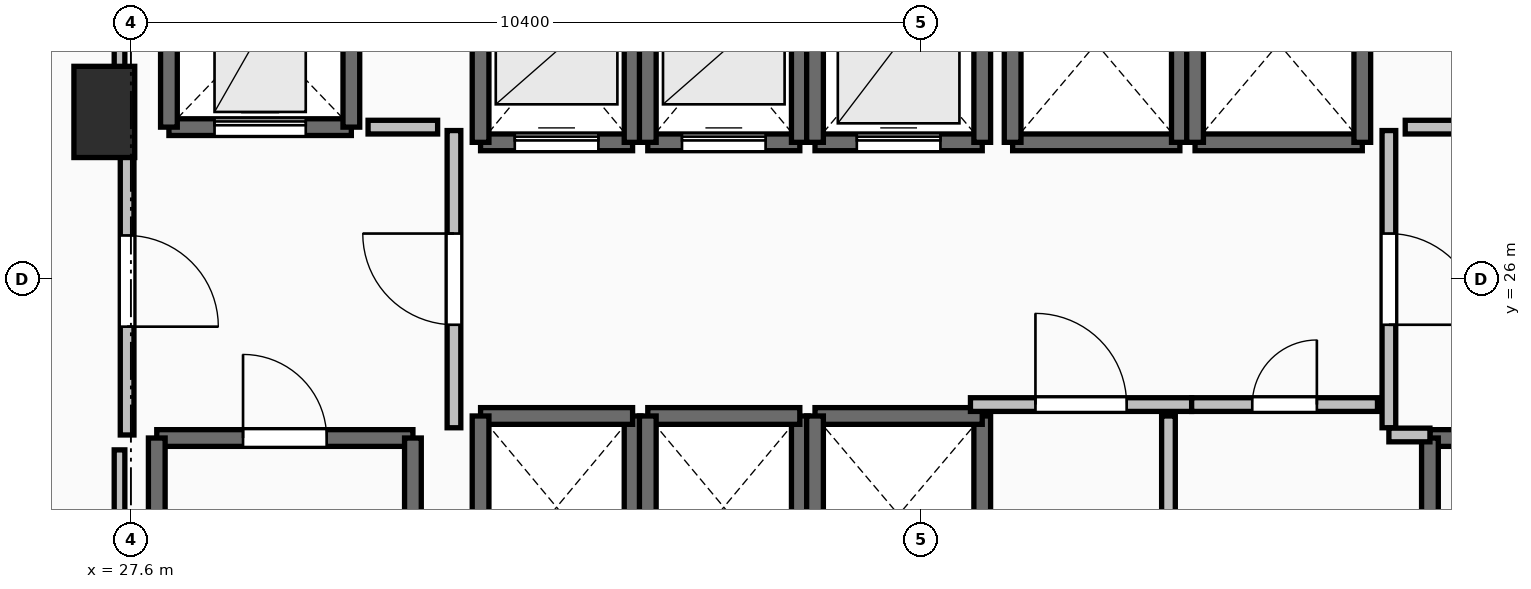
"""IFC4 building model, lengths in metres.
Left out: names, types, materials, properties, quantities, classifications, styles, units other than length and angle.
Written with IfcOpenShell. Run it as: python <this file> out.ifc"""

import sys

from ifc_helpers import new_model, si_unit, direction, frame, frame_2d, origin, origin_2d, place, context, subcontext, project, spatial, rectangle, extrude, element, fill, save


model = new_model("IFC4")
c1 = context("Model", 3, precision=1e-05, world=origin(), true_north=direction((0.0, 1.0)))
c2 = subcontext(c1, "Body", "Model", "MODEL_VIEW")
j1 = project(units=[si_unit("LENGTHUNIT", "METRE"), si_unit("PLANEANGLEUNIT", "RADIAN")], contexts=[c1])
p1 = place(None, origin())
s1 = spatial("IfcSite", under=j1, at=p1, CompositionType="ELEMENT")
p2 = place(p1, origin())
s2 = spatial("IfcBuilding", under=s1, at=p2, CompositionType="ELEMENT")
p3 = place(p2, frame((0.0, 0.0, 4.8)))
s3 = spatial("IfcBuildingStorey", under=s2, at=p3, CompositionType="ELEMENT", Elevation=4.8)
p4 = place(p3, frame((27.25, 28.2, 0.0), z_axis=(0.0, 0.0, 1.0), x_axis=(1.0, 0.0, 0.0)))
e1 = element("IfcColumn", 1, at=p4, inside=s3, PredefinedType="PILASTER", context=c2, shape_type="SweptSolid", body=[
    extrude(rectangle(XDim=0.8, YDim=1.2, at=origin_2d()), origin(), (0.0, 0.0, 1.0), 4.8),
])
p5 = place(p3, frame((27.94, 23.91, 0.0), z_axis=(0.0, 0.0, 1.0), x_axis=(1.0, 0.0, 0.0)))
e2 = element("IfcWall", 2, at=p5, inside=s3, PredefinedType="SOLIDWALL", context=c2, shape_type="SweptSolid", body=[
    extrude(rectangle(XDim=3.37, YDim=0.22, at=frame_2d((1.685, 0.0))), origin(), (0.0, 0.0, 1.0), 4.48),
])
p6 = place(p5, frame((1.135, 0.0, 0.0)))
e3 = element("IfcOpeningElement", 3, at=p6, cuts=e2, PredefinedType="OPENING", context=c2, shape_type="SweptSolid", body=[
    extrude(rectangle(XDim=1.1, YDim=2.15, at=frame_2d((0.55, 1.075))), frame((0.0, 0.125, 0.0), z_axis=(0.0, -1.0, 0.0), x_axis=(1.0, 0.0, 0.0)), (0.0, 0.0, 1.0), 0.25),
])
for number, where, z_axis, x_axis in (
    (4, (31.31, 23.91, 0.0), (0.0, 0.0, 1.0), (0.0, -1.0, 0.0)),
    (5, (27.94, 16.49, 0.0), (0.0, 0.0, 1.0), (0.0, 1.0, 0.0)),
):
    element("IfcWall", number, at=place(p3, frame(where, z_axis=z_axis, x_axis=x_axis)), inside=s3, PredefinedType="SOLIDWALL", context=c2, shape_type="SweptSolid", body=[
        extrude(rectangle(XDim=7.42, YDim=0.22, at=frame_2d((3.71, 0.0))), origin(), (0.0, 0.0, 1.0), 4.48),
    ])
p7 = place(p3, frame((44.69, 23.91, 0.0), z_axis=(0.0, 0.0, 1.0), x_axis=(1.0, 0.0, 0.0)))
e6 = element("IfcWall", 6, at=p7, inside=s3, PredefinedType="SOLIDWALL", context=c2, shape_type="SweptSolid", body=[
    extrude(rectangle(XDim=3.37, YDim=0.22, at=frame_2d((1.685, 0.0))), origin(), (0.0, 0.0, 1.0), 4.48),
])
p8 = place(p7, frame((1.135, 0.0, 0.0)))
e7 = element("IfcOpeningElement", 7, at=p8, cuts=e6, PredefinedType="OPENING", context=c2, shape_type="SweptSolid", body=[
    extrude(rectangle(XDim=1.1, YDim=2.15, at=frame_2d((0.55, 1.075))), frame((0.0, 0.125, 0.0), z_axis=(0.0, -1.0, 0.0), x_axis=(1.0, 0.0, 0.0)), (0.0, 0.0, 1.0), 0.25),
])
p9 = place(p3, frame((44.69, 16.49, 0.0), z_axis=(0.0, 0.0, 1.0), x_axis=(0.0, 1.0, 0.0)))
e8 = element("IfcWall", 8, at=p9, inside=s3, PredefinedType="SOLIDWALL", context=c2, shape_type="SweptSolid", body=[
    extrude(rectangle(XDim=7.42, YDim=0.22, at=frame_2d((3.71, 0.0))), origin(), (0.0, 0.0, 1.0), 4.48),
])
p10 = place(p3, frame((32.2, 27.8, 0.0), z_axis=(0.0, 0.0, 1.0), x_axis=(1.0, 0.0, 0.0)))
e9 = element("IfcWall", 9, at=p10, inside=s3, PredefinedType="SOLIDWALL", context=c2, shape_type="SweptSolid", body=[
    extrude(rectangle(XDim=2.0, YDim=0.22, at=frame_2d((1.0, 0.0))), origin(), (0.0, 0.0, 1.0), 4.48),
])
p11 = place(p10, frame((0.45, 0.0, 0.0)))
e10 = element("IfcOpeningElement", 10, at=p11, cuts=e9, PredefinedType="OPENING", context=c2, shape_type="SweptSolid", body=[
    extrude(rectangle(XDim=1.1, YDim=2.2, at=frame_2d((0.55, 1.1))), frame((0.0, 0.125, 0.0), z_axis=(0.0, -1.0, 0.0), x_axis=(1.0, 0.0, 0.0)), (0.0, 0.0, 1.0), 0.25),
])
for number, where, z_axis, x_axis in (
    (11, (34.2, 27.8, 0.0), (0.0, 0.0, 1.0), (0.0, 1.0, 0.0)),
    (12, (32.2, 30.2, 0.0), (0.0, 0.0, 1.0), (0.0, -1.0, 0.0)),
):
    element("IfcWall", number, at=place(p3, frame(where, z_axis=z_axis, x_axis=x_axis)), inside=s3, PredefinedType="SOLIDWALL", context=c2, shape_type="SweptSolid", body=[
        extrude(rectangle(XDim=2.4, YDim=0.22, at=frame_2d((1.2, 0.0))), origin(), (0.0, 0.0, 1.0), 4.48),
    ])
p12 = place(p3, frame((34.4, 27.8, 0.0), z_axis=(0.0, 0.0, 1.0), x_axis=(1.0, 0.0, 0.0)))
e13 = element("IfcWall", 13, at=p12, inside=s3, PredefinedType="SOLIDWALL", context=c2, shape_type="SweptSolid", body=[
    extrude(rectangle(XDim=2.0, YDim=0.22, at=frame_2d((1.0, 0.0))), origin(), (0.0, 0.0, 1.0), 4.48),
])
p13 = place(p12, frame((0.45, 0.0, 0.0)))
e14 = element("IfcOpeningElement", 14, at=p13, cuts=e13, PredefinedType="OPENING", context=c2, shape_type="SweptSolid", body=[
    extrude(rectangle(XDim=1.1, YDim=2.2, at=frame_2d((0.55, 1.1))), frame((0.0, 0.125, 0.0), z_axis=(0.0, -1.0, 0.0), x_axis=(1.0, 0.0, 0.0)), (0.0, 0.0, 1.0), 0.25),
])
for number, where, z_axis, x_axis in (
    (15, (36.4, 27.8, 0.0), (0.0, 0.0, 1.0), (0.0, 1.0, 0.0)),
    (16, (34.4, 30.2, 0.0), (0.0, 0.0, 1.0), (0.0, -1.0, 0.0)),
):
    element("IfcWall", number, at=place(p3, frame(where, z_axis=z_axis, x_axis=x_axis)), inside=s3, PredefinedType="SOLIDWALL", context=c2, shape_type="SweptSolid", body=[
        extrude(rectangle(XDim=2.4, YDim=0.22, at=frame_2d((1.2, 0.0))), origin(), (0.0, 0.0, 1.0), 4.48),
    ])
p14 = place(p3, frame((36.6, 27.8, 0.0), z_axis=(0.0, 0.0, 1.0), x_axis=(1.0, 0.0, 0.0)))
e17 = element("IfcWall", 17, at=p14, inside=s3, PredefinedType="SOLIDWALL", context=c2, shape_type="SweptSolid", body=[
    extrude(rectangle(XDim=2.2, YDim=0.22, at=frame_2d((1.1, 0.0))), origin(), (0.0, 0.0, 1.0), 4.48),
])
p15 = place(p14, frame((0.55, 0.0, 0.0)))
e18 = element("IfcOpeningElement", 18, at=p15, cuts=e17, PredefinedType="OPENING", context=c2, shape_type="SweptSolid", body=[
    extrude(rectangle(XDim=1.1, YDim=2.2, at=frame_2d((0.55, 1.1))), frame((0.0, 0.125, 0.0), z_axis=(0.0, -1.0, 0.0), x_axis=(1.0, 0.0, 0.0)), (0.0, 0.0, 1.0), 0.25),
])
for number, where, z_axis, x_axis in (
    (19, (38.8, 27.8, 0.0), (0.0, 0.0, 1.0), (0.0, 1.0, 0.0)),
    (20, (36.6, 30.4, 0.0), (0.0, 0.0, 1.0), (0.0, -1.0, 0.0)),
):
    element("IfcWall", number, at=place(p3, frame(where, z_axis=z_axis, x_axis=x_axis)), inside=s3, PredefinedType="SOLIDWALL", context=c2, shape_type="SweptSolid", body=[
        extrude(rectangle(XDim=2.6, YDim=0.22, at=frame_2d((1.3, 0.0))), origin(), (0.0, 0.0, 1.0), 4.48),
    ])
p16 = place(p3, frame((34.2, 21.8, 0.0), z_axis=(0.0, 0.0, 1.0), x_axis=(0.0, 1.0, 0.0)))
e21 = element("IfcWall", 21, at=p16, inside=s3, PredefinedType="SOLIDWALL", context=c2, shape_type="SweptSolid", body=[
    extrude(rectangle(XDim=2.4, YDim=0.22, at=frame_2d((1.2, 0.0))), origin(), (0.0, 0.0, 1.0), 4.48),
])
p17 = place(p3, frame((34.2, 24.2, 0.0), z_axis=(0.0, 0.0, 1.0), x_axis=(-1.0, 0.0, 0.0)))
e22 = element("IfcWall", 22, at=p17, inside=s3, PredefinedType="SOLIDWALL", context=c2, shape_type="SweptSolid", body=[
    extrude(rectangle(XDim=2.0, YDim=0.22, at=frame_2d((1.0, 0.0))), origin(), (0.0, 0.0, 1.0), 4.48),
])
for number, where, z_axis, x_axis in (
    (23, (32.2, 24.2, 0.0), (0.0, 0.0, 1.0), (0.0, -1.0, 0.0)),
    (24, (36.4, 21.8, 0.0), (0.0, 0.0, 1.0), (0.0, 1.0, 0.0)),
):
    element("IfcWall", number, at=place(p3, frame(where, z_axis=z_axis, x_axis=x_axis)), inside=s3, PredefinedType="SOLIDWALL", context=c2, shape_type="SweptSolid", body=[
        extrude(rectangle(XDim=2.4, YDim=0.22, at=frame_2d((1.2, 0.0))), origin(), (0.0, 0.0, 1.0), 4.48),
    ])
p18 = place(p3, frame((36.4, 24.2, 0.0), z_axis=(0.0, 0.0, 1.0), x_axis=(-1.0, 0.0, 0.0)))
e25 = element("IfcWall", 25, at=p18, inside=s3, PredefinedType="SOLIDWALL", context=c2, shape_type="SweptSolid", body=[
    extrude(rectangle(XDim=2.0, YDim=0.22, at=frame_2d((1.0, 0.0))), origin(), (0.0, 0.0, 1.0), 4.48),
])
p19 = place(p3, frame((34.4, 24.2, 0.0), z_axis=(0.0, 0.0, 1.0), x_axis=(0.0, -1.0, 0.0)))
e26 = element("IfcWall", 26, at=p19, inside=s3, PredefinedType="SOLIDWALL", context=c2, shape_type="SweptSolid", body=[
    extrude(rectangle(XDim=2.4, YDim=0.22, at=frame_2d((1.2, 0.0))), origin(), (0.0, 0.0, 1.0), 4.48),
])
p20 = place(p3, frame((38.8, 21.6, 0.0), z_axis=(0.0, 0.0, 1.0), x_axis=(0.0, 1.0, 0.0)))
e27 = element("IfcWall", 27, at=p20, inside=s3, PredefinedType="SOLIDWALL", context=c2, shape_type="SweptSolid", body=[
    extrude(rectangle(XDim=2.6, YDim=0.22, at=frame_2d((1.3, 0.0))), origin(), (0.0, 0.0, 1.0), 4.48),
])
p21 = place(p3, frame((38.8, 24.2, 0.0), z_axis=(0.0, 0.0, 1.0), x_axis=(-1.0, 0.0, 0.0)))
e28 = element("IfcWall", 28, at=p21, inside=s3, PredefinedType="SOLIDWALL", context=c2, shape_type="SweptSolid", body=[
    extrude(rectangle(XDim=2.2, YDim=0.22, at=frame_2d((1.1, 0.0))), origin(), (0.0, 0.0, 1.0), 4.48),
])
p22 = place(p3, frame((36.6, 24.2, 0.0), z_axis=(0.0, 0.0, 1.0), x_axis=(0.0, -1.0, 0.0)))
e29 = element("IfcWall", 29, at=p22, inside=s3, PredefinedType="SOLIDWALL", context=c2, shape_type="SweptSolid", body=[
    extrude(rectangle(XDim=2.6, YDim=0.22, at=frame_2d((1.3, 0.0))), origin(), (0.0, 0.0, 1.0), 4.48),
])
p23 = place(p3, frame((39.2, 27.8, 0.0), z_axis=(0.0, 0.0, 1.0), x_axis=(1.0, 0.0, 0.0)))
e30 = element("IfcWall", 30, at=p23, inside=s3, PredefinedType="SOLIDWALL", context=c2, shape_type="SweptSolid", body=[
    extrude(rectangle(XDim=2.2, YDim=0.22, at=frame_2d((1.1, 0.0))), origin(), (0.0, 0.0, 1.0), 4.48),
])
for number, where, z_axis, x_axis in (
    (31, (41.4, 27.8, 0.0), (0.0, 0.0, 1.0), (0.0, 1.0, 0.0)),
    (32, (39.2, 30.4, 0.0), (0.0, 0.0, 1.0), (0.0, -1.0, 0.0)),
):
    element("IfcWall", number, at=place(p3, frame(where, z_axis=z_axis, x_axis=x_axis)), inside=s3, PredefinedType="SOLIDWALL", context=c2, shape_type="SweptSolid", body=[
        extrude(rectangle(XDim=2.6, YDim=0.22, at=frame_2d((1.3, 0.0))), origin(), (0.0, 0.0, 1.0), 4.48),
    ])
p24 = place(p3, frame((41.6, 27.8, 0.0), z_axis=(0.0, 0.0, 1.0), x_axis=(1.0, 0.0, 0.0)))
e33 = element("IfcWall", 33, at=p24, inside=s3, PredefinedType="SOLIDWALL", context=c2, shape_type="SweptSolid", body=[
    extrude(rectangle(XDim=2.2, YDim=0.22, at=frame_2d((1.1, 0.0))), origin(), (0.0, 0.0, 1.0), 4.48),
])
for number, where, z_axis, x_axis in (
    (34, (43.8, 27.8, 0.0), (0.0, 0.0, 1.0), (0.0, 1.0, 0.0)),
    (35, (41.6, 30.4, 0.0), (0.0, 0.0, 1.0), (0.0, -1.0, 0.0)),
):
    element("IfcWall", number, at=place(p3, frame(where, z_axis=z_axis, x_axis=x_axis)), inside=s3, PredefinedType="SOLIDWALL", context=c2, shape_type="SweptSolid", body=[
        extrude(rectangle(XDim=2.6, YDim=0.22, at=frame_2d((1.3, 0.0))), origin(), (0.0, 0.0, 1.0), 4.48),
    ])
p25 = place(p3, frame((28.1, 28.0, 0.0), z_axis=(0.0, 0.0, 1.0), x_axis=(1.0, 0.0, 0.0)))
e36 = element("IfcWall", 36, at=p25, inside=s3, PredefinedType="SHEAR", context=c2, shape_type="SweptSolid", body=[
    extrude(rectangle(XDim=2.4, YDim=0.22, at=frame_2d((1.2, 0.0))), origin(), (0.0, 0.0, 1.0), 4.48),
])
p26 = place(p25, frame((0.6, 0.0, 0.0)))
e37 = element("IfcOpeningElement", 37, at=p26, cuts=e36, PredefinedType="OPENING", context=c2, shape_type="SweptSolid", body=[
    extrude(rectangle(XDim=1.2, YDim=2.2, at=frame_2d((0.6, 1.1))), frame((0.0, 0.125, 0.0), z_axis=(0.0, -1.0, 0.0), x_axis=(1.0, 0.0, 0.0)), (0.0, 0.0, 1.0), 0.25),
])
for number, where, z_axis, x_axis in (
    (38, (30.5, 28.0, 0.0), (0.0, 0.0, 1.0), (0.0, 1.0, 0.0)),
    (39, (28.1, 30.5, 0.0), (0.0, 0.0, 1.0), (0.0, -1.0, 0.0)),
):
    element("IfcWall", number, at=place(p3, frame(where, z_axis=z_axis, x_axis=x_axis)), inside=s3, PredefinedType="SHEAR", context=c2, shape_type="SweptSolid", body=[
        extrude(rectangle(XDim=2.5, YDim=0.22, at=frame_2d((1.25, 0.0))), origin(), (0.0, 0.0, 1.0), 4.48),
    ])
p27 = place(p3, frame((31.85, 24.045, 0.0), z_axis=(0.0, 0.0, 1.0), x_axis=(0.0, 1.0, 0.0)))
e40 = element("IfcWall", 40, at=p27, inside=s3, PredefinedType="PARTITIONING", context=c2, shape_type="SweptSolid", body=[
    extrude(rectangle(XDim=3.91, YDim=0.18, at=frame_2d((1.955, 0.0))), origin(), (0.0, 0.0, 1.0), 4.48),
])
p28 = place(p27, frame((1.355, 0.0, 0.0)))
e41 = element("IfcOpeningElement", 41, at=p28, cuts=e40, PredefinedType="OPENING", context=c2, shape_type="SweptSolid", body=[
    extrude(rectangle(XDim=1.2, YDim=2.15, at=frame_2d((0.6, 1.075))), frame((0.0, 0.105, 0.0), z_axis=(0.0, -1.0, 0.0), x_axis=(1.0, 0.0, 0.0)), (0.0, 0.0, 1.0), 0.21),
])
p29 = place(p3, frame((27.55, 28.0, 0.0), z_axis=(0.0, 0.0, 1.0), x_axis=(0.0, -1.0, 0.0)))
e42 = element("IfcWall", 42, at=p29, inside=s3, PredefinedType="PARTITIONING", context=c2, shape_type="SweptSolid", body=[
    extrude(rectangle(XDim=4.05, YDim=0.18, at=frame_2d((2.025, 0.0))), origin(), (0.0, 0.0, 1.0), 4.48),
])
p30 = place(p29, frame((1.425, 0.0, 0.0)))
e43 = element("IfcOpeningElement", 43, at=p30, cuts=e42, PredefinedType="OPENING", context=c2, shape_type="SweptSolid", body=[
    extrude(rectangle(XDim=1.2, YDim=2.15, at=frame_2d((0.6, 1.075))), frame((0.0, 0.105, 0.0), z_axis=(0.0, -1.0, 0.0), x_axis=(1.0, 0.0, 0.0)), (0.0, 0.0, 1.0), 0.21),
])
p31 = place(p3, frame((44.15, 27.955, 0.0), z_axis=(0.0, 0.0, 1.0), x_axis=(0.0, -1.0, 0.0)))
e44 = element("IfcWall", 44, at=p31, inside=s3, PredefinedType="PARTITIONING", context=c2, shape_type="SweptSolid", body=[
    extrude(rectangle(XDim=3.91, YDim=0.18, at=frame_2d((1.955, 0.0))), origin(), (0.0, 0.0, 1.0), 4.48),
])
p32 = place(p31, frame((1.355, 0.0, 0.0)))
e45 = element("IfcOpeningElement", 45, at=p32, cuts=e44, PredefinedType="OPENING", context=c2, shape_type="SweptSolid", body=[
    extrude(rectangle(XDim=1.2, YDim=2.15, at=frame_2d((0.6, 1.075))), frame((0.0, 0.105, 0.0), z_axis=(0.0, -1.0, 0.0), x_axis=(1.0, 0.0, 0.0)), (0.0, 0.0, 1.0), 0.21),
])
p33 = place(p3, frame((44.15, 23.95, 0.0), z_axis=(0.0, 0.0, 1.0), x_axis=(1.0, 0.0, 0.0)))
e46 = element("IfcWall", 46, at=p33, inside=s3, PredefinedType="PARTITIONING", context=c2, shape_type="SweptSolid", body=[
    extrude(rectangle(XDim=0.54, YDim=0.18, at=frame_2d((0.27, 0.0))), origin(), (0.0, 0.0, 1.0), 4.48),
])
p34 = place(p3, frame((38.645, 24.35, 0.0), z_axis=(0.0, 0.0, 1.0), x_axis=(1.0, 0.0, 0.0)))
e47 = element("IfcWall", 47, at=p34, inside=s3, PredefinedType="PARTITIONING", context=c2, shape_type="SweptSolid", body=[
    extrude(rectangle(XDim=2.91, YDim=0.18, at=frame_2d((1.455, 0.0))), origin(), (0.0, 0.0, 1.0), 4.48),
])
p35 = place(p34, frame((0.855, 0.0, 0.0)))
e48 = element("IfcOpeningElement", 48, at=p35, cuts=e47, PredefinedType="OPENING", context=c2, shape_type="SweptSolid", body=[
    extrude(rectangle(XDim=1.2, YDim=2.15, at=frame_2d((0.6, 1.075))), frame((0.0, 0.105, 0.0), z_axis=(0.0, -1.0, 0.0), x_axis=(1.0, 0.0, 0.0)), (0.0, 0.0, 1.0), 0.21),
])
p36 = place(p3, frame((41.555, 24.35, 0.0), z_axis=(0.0, 0.0, 1.0), x_axis=(1.0, 0.0, 0.0)))
e49 = element("IfcWall", 49, at=p36, inside=s3, PredefinedType="PARTITIONING", context=c2, shape_type="SweptSolid", body=[
    extrude(rectangle(XDim=2.445, YDim=0.18, at=frame_2d((1.223, 0.0))), origin(), (0.0, 0.0, 1.0), 4.48),
])
p37 = place(p36, frame((0.798, 0.0, 0.0)))
e50 = element("IfcOpeningElement", 50, at=p37, cuts=e49, PredefinedType="OPENING", context=c2, shape_type="SweptSolid", body=[
    extrude(rectangle(XDim=0.85, YDim=2.1, at=frame_2d((0.425, 1.05))), frame((0.0, 0.105, 0.0), z_axis=(0.0, -1.0, 0.0), x_axis=(1.0, 0.0, 0.0)), (0.0, 0.0, 1.0), 0.21),
])
p38 = place(p3, frame((41.25, 20.305, 0.0), z_axis=(0.0, 0.0, 1.0), x_axis=(0.0, 1.0, 0.0)))
e51 = element("IfcWall", 51, at=p38, inside=s3, PredefinedType="PARTITIONING", context=c2, shape_type="SweptSolid", body=[
    extrude(rectangle(XDim=3.895, YDim=0.18, at=frame_2d((1.948, 0.0))), origin(), (0.0, 0.0, 1.0), 4.48),
])
p39 = place(p38, frame((1.522, 0.0, 0.0)))
e52 = element("IfcOpeningElement", 52, at=p39, cuts=e51, PredefinedType="OPENING", context=c2, shape_type="SweptSolid", body=[
    extrude(rectangle(XDim=0.85, YDim=2.1, at=frame_2d((0.425, 1.05))), frame((0.0, 0.105, 0.0), z_axis=(0.0, -1.0, 0.0), x_axis=(1.0, 0.0, 0.0)), (0.0, 0.0, 1.0), 0.21),
])
for number, where, z_axis, x_axis in (
    (53, (31.635, 28.0, 0.0), (0.0, 0.0, 1.0), (-1.0, 0.0, 0.0)),
    (54, (45.28, 28.0, 0.0), (0.0, 0.0, 1.0), (-1.0, 0.0, 0.0)),
):
    element("IfcWall", number, at=place(p3, frame(where, z_axis=z_axis, x_axis=x_axis)), inside=s3, PredefinedType="PARTITIONING", context=c2, shape_type="SweptSolid", body=[
        extrude(rectangle(XDim=0.915, YDim=0.18, at=frame_2d((0.458, 0.0))), origin(), (0.0, 0.0, 1.0), 4.48),
    ])
p40 = place(p3, frame((27.45, 16.24, 0.0), z_axis=(0.0, 0.0, 1.0), x_axis=(0.0, 1.0, 0.0)))
e55 = element("IfcWall", 55, at=p40, inside=s3, PredefinedType="PARTITIONING", context=c2, shape_type="SweptSolid", body=[
    extrude(rectangle(XDim=7.514, YDim=0.14, at=frame_2d((3.757, 0.0))), origin(), (0.0, 0.0, 1.0), 2.406),
])
p41 = place(p3, frame((27.45, 28.196, 0.0), z_axis=(0.0, 0.0, 1.0), x_axis=(0.0, 1.0, 0.0)))
e56 = element("IfcWall", 56, at=p41, inside=s3, PredefinedType="PARTITIONING", context=c2, shape_type="SweptSolid", body=[
    extrude(rectangle(XDim=5.254, YDim=0.14, at=frame_2d((2.627, 0.0))), origin(), (0.0, 0.0, 1.0), 3.672),
])
p42 = place(p6, origin())
e57 = element("IfcDoor", 57, at=p42, inside=s3, OperationType="SINGLE_SWING_LEFT", PredefinedType="DOOR", context=c2, shape_type="SweptSolid", body=[
    extrude(rectangle(XDim=1.1, YDim=2.15, at=frame_2d((0.55, 1.075))), frame((0.0, 0.025, 0.0), z_axis=(0.0, -1.0, 0.0), x_axis=(1.0, 0.0, 0.0)), (0.0, 0.0, 1.0), 0.05),
])
fill(e3, e57)
p43 = place(p11, origin())
e58 = element("IfcDoor", 58, at=p43, inside=s3, OperationType="SLIDING_TO_LEFT", PredefinedType="DOOR", context=c2, shape_type="SweptSolid", body=[
    extrude(rectangle(XDim=1.1, YDim=2.2, at=frame_2d((0.55, 1.1))), frame((0.0, 0.025, 0.0), z_axis=(0.0, -1.0, 0.0), x_axis=(1.0, 0.0, 0.0)), (0.0, 0.0, 1.0), 0.05),
])
fill(e10, e58)
p44 = place(p13, origin())
e59 = element("IfcDoor", 59, at=p44, inside=s3, OperationType="SLIDING_TO_LEFT", PredefinedType="DOOR", context=c2, shape_type="SweptSolid", body=[
    extrude(rectangle(XDim=1.1, YDim=2.2, at=frame_2d((0.55, 1.1))), frame((0.0, 0.025, 0.0), z_axis=(0.0, -1.0, 0.0), x_axis=(1.0, 0.0, 0.0)), (0.0, 0.0, 1.0), 0.05),
])
fill(e14, e59)
p45 = place(p15, origin())
e60 = element("IfcDoor", 60, at=p45, inside=s3, OperationType="SLIDING_TO_LEFT", PredefinedType="DOOR", context=c2, shape_type="SweptSolid", body=[
    extrude(rectangle(XDim=1.1, YDim=2.2, at=frame_2d((0.55, 1.1))), frame((0.0, 0.025, 0.0), z_axis=(0.0, -1.0, 0.0), x_axis=(1.0, 0.0, 0.0)), (0.0, 0.0, 1.0), 0.05),
])
fill(e18, e60)
p46 = place(p26, origin())
e61 = element("IfcDoor", 61, at=p46, inside=s3, OperationType="SLIDING_TO_LEFT", PredefinedType="DOOR", context=c2, shape_type="SweptSolid", body=[
    extrude(rectangle(XDim=1.2, YDim=2.2, at=frame_2d((0.6, 1.1))), frame((0.0, 0.025, 0.0), z_axis=(0.0, -1.0, 0.0), x_axis=(1.0, 0.0, 0.0)), (0.0, 0.0, 1.0), 0.05),
])
fill(e37, e61)
p47 = place(p28, origin())
e62 = element("IfcDoor", 62, at=p47, inside=s3, OperationType="SINGLE_SWING_RIGHT", PredefinedType="DOOR", context=c2, shape_type="SweptSolid", body=[
    extrude(rectangle(XDim=1.2, YDim=2.15, at=frame_2d((0.6, 1.075))), frame((0.0, 0.025, 0.0), z_axis=(0.0, -1.0, 0.0), x_axis=(1.0, 0.0, 0.0)), (0.0, 0.0, 1.0), 0.05),
])
fill(e41, e62)
p48 = place(p30, origin())
e63 = element("IfcDoor", 63, at=p48, inside=s3, OperationType="SINGLE_SWING_RIGHT", PredefinedType="DOOR", context=c2, shape_type="SweptSolid", body=[
    extrude(rectangle(XDim=1.2, YDim=2.15, at=frame_2d((0.6, 1.075))), frame((0.0, 0.025, 0.0), z_axis=(0.0, -1.0, 0.0), x_axis=(1.0, 0.0, 0.0)), (0.0, 0.0, 1.0), 0.05),
])
fill(e43, e63)
p49 = place(p32, origin())
e64 = element("IfcDoor", 64, at=p49, inside=s3, OperationType="SINGLE_SWING_RIGHT", PredefinedType="DOOR", context=c2, shape_type="SweptSolid", body=[
    extrude(rectangle(XDim=1.2, YDim=2.15, at=frame_2d((0.6, 1.075))), frame((0.0, 0.025, 0.0), z_axis=(0.0, -1.0, 0.0), x_axis=(1.0, 0.0, 0.0)), (0.0, 0.0, 1.0), 0.05),
])
fill(e45, e64)
p50 = place(p35, origin())
e65 = element("IfcDoor", 65, at=p50, inside=s3, OperationType="SINGLE_SWING_LEFT", PredefinedType="DOOR", context=c2, shape_type="SweptSolid", body=[
    extrude(rectangle(XDim=1.2, YDim=2.15, at=frame_2d((0.6, 1.075))), frame((0.0, 0.025, 0.0), z_axis=(0.0, -1.0, 0.0), x_axis=(1.0, 0.0, 0.0)), (0.0, 0.0, 1.0), 0.05),
])
fill(e48, e65)
p51 = place(p37, origin())
e66 = element("IfcDoor", 66, at=p51, inside=s3, OperationType="SINGLE_SWING_RIGHT", PredefinedType="DOOR", context=c2, shape_type="SweptSolid", body=[
    extrude(rectangle(XDim=0.85, YDim=2.1, at=frame_2d((0.425, 1.05))), frame((0.0, 0.025, 0.0), z_axis=(0.0, -1.0, 0.0), x_axis=(1.0, 0.0, 0.0)), (0.0, 0.0, 1.0), 0.05),
])
fill(e50, e66)
save(model, sys.argv[1])
